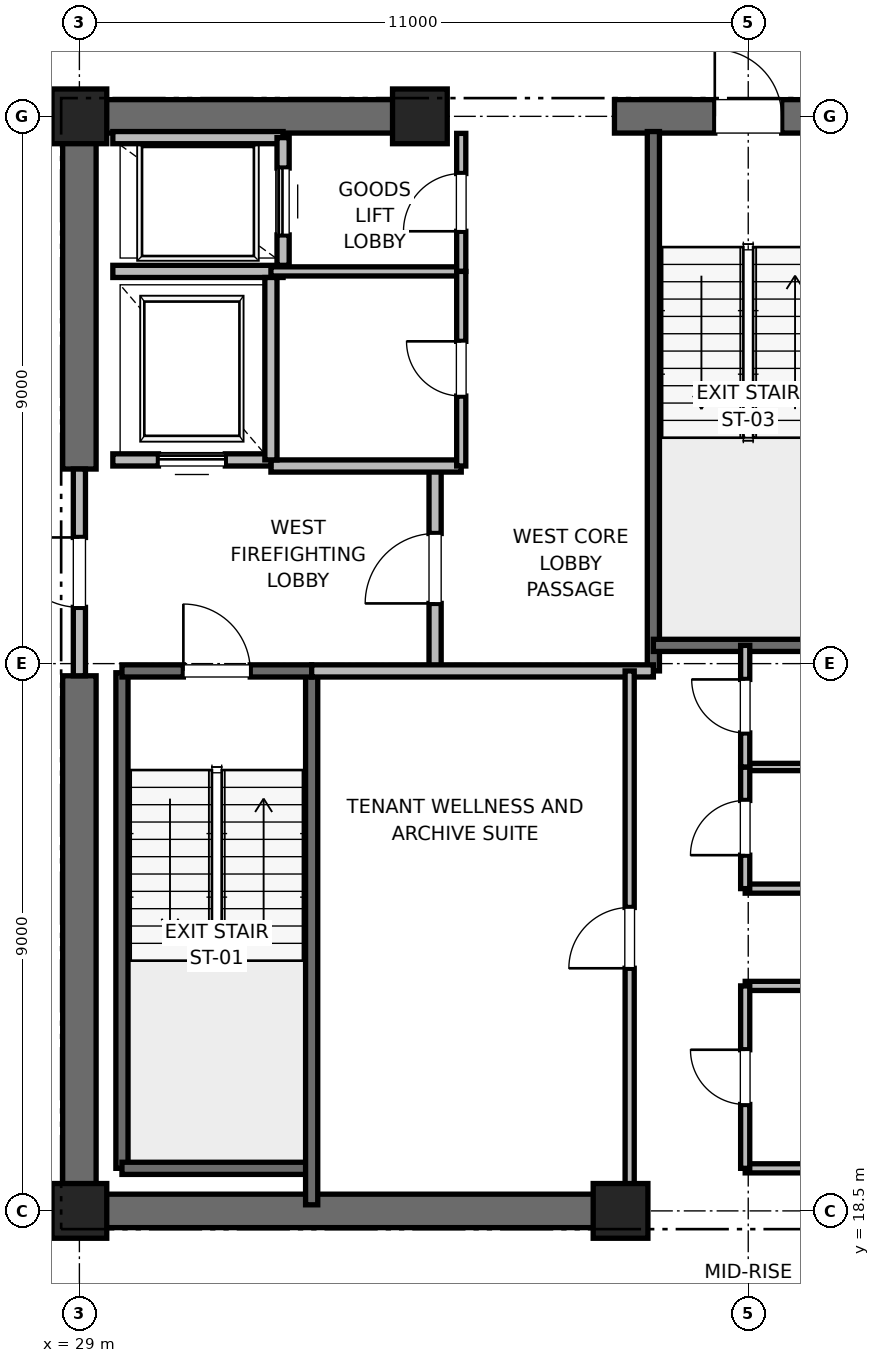
"""IFC4 building model, lengths in metres.
Left out: names, types, materials, properties, quantities, classifications, styles, units other than length and angle.
Written with IfcOpenShell. Run it as: python <this file> out.ifc"""

import sys

from ifc_helpers import new_model, si_unit, direction, frame, frame_2d, origin, origin_2d, place, context, subcontext, project, spatial, rectangle, extrude, element, fill, save


model = new_model("IFC4")
c1 = context("Model", 3, precision=1e-05, world=origin(), true_north=direction((0.0, 1.0)))
c2 = subcontext(c1, "Body", "Model", "MODEL_VIEW")
j1 = project(units=[si_unit("LENGTHUNIT", "METRE"), si_unit("PLANEANGLEUNIT", "RADIAN")], contexts=[c1])
p1 = place(None, origin())
s1 = spatial("IfcSite", under=j1, at=p1, CompositionType="ELEMENT")
p2 = place(p1, origin())
s2 = spatial("IfcBuilding", under=s1, at=p2, CompositionType="ELEMENT")
p3 = place(p2, frame((0.0, 0.0, 213.2)))
s3 = spatial("IfcBuildingStorey", under=s2, at=p3, CompositionType="ELEMENT", Elevation=213.2)
for number, where, z_axis, x_axis in (
    (1, (29.0, 18.5, 0.0), (0.0, 0.0, 1.0), (1.0, 0.0, 0.0)),
    (2, (29.0, 36.5, 0.0), (0.0, 0.0, 1.0), (1.0, 0.0, 0.0)),
    (3, (37.9, 18.5, 0.0), (0.0, 0.0, 1.0), (1.0, 0.0, 0.0)),
    (4, (34.6, 36.5, 0.0), (0.0, 0.0, 1.0), (1.0, 0.0, 0.0)),
):
    element("IfcColumn", number, at=place(p3, frame(where, z_axis=z_axis, x_axis=x_axis)), inside=s3, PredefinedType="PILASTER", context=c2, shape_type="SweptSolid", body=[
        extrude(rectangle(XDim=0.9, YDim=0.9, at=origin_2d()), origin(), (0.0, 0.0, 1.0), 4.0),
    ])
p4 = place(p3, frame((29.0, 18.5, 0.0), z_axis=(0.0, 0.0, 1.0), x_axis=(1.0, 0.0, 0.0)))
e5 = element("IfcWall", 5, at=p4, inside=s3, PredefinedType="SHEAR", context=c2, shape_type="SweptSolid", body=[
    extrude(rectangle(XDim=9.2, YDim=0.55, at=frame_2d((4.6, 0.0))), origin(), (0.0, 0.0, 1.0), 3.775),
])
p5 = place(p3, frame((29.0, 36.5, 0.0), z_axis=(0.0, 0.0, 1.0), x_axis=(1.0, 0.0, 0.0)))
e6 = element("IfcWall", 6, at=p5, inside=s3, PredefinedType="SHEAR", context=c2, shape_type="SweptSolid", body=[
    extrude(rectangle(XDim=5.8, YDim=0.55, at=frame_2d((2.9, 0.0))), origin(), (0.0, 0.0, 1.0), 3.775),
])
p6 = place(p3, frame((37.8, 36.5, 0.0), z_axis=(0.0, 0.0, 1.0), x_axis=(1.0, 0.0, 0.0)))
e7 = element("IfcWall", 7, at=p6, inside=s3, PredefinedType="SHEAR", context=c2, shape_type="SweptSolid", body=[
    extrude(rectangle(XDim=4.4, YDim=0.55, at=frame_2d((2.2, 0.0))), origin(), (0.0, 0.0, 1.0), 3.775),
])
p7 = place(p6, frame((1.65, 0.0, 0.0)))
e8 = element("IfcOpeningElement", 8, at=p7, cuts=e7, PredefinedType="OPENING", context=c2, shape_type="SweptSolid", body=[
    extrude(rectangle(XDim=1.1, YDim=2.15, at=frame_2d((0.55, 1.075))), frame((0.0, 0.275, 0.0), z_axis=(0.0, -1.0, 0.0), x_axis=(1.0, 0.0, 0.0)), (0.0, 0.0, 1.0), 0.55),
])
p8 = place(p3, frame((29.0, 18.5, 0.0), z_axis=(0.0, 0.0, 1.0), x_axis=(0.0, 1.0, 0.0)))
e9 = element("IfcWall", 9, at=p8, inside=s3, PredefinedType="SHEAR", context=c2, shape_type="SweptSolid", body=[
    extrude(rectangle(XDim=8.8, YDim=0.55, at=frame_2d((4.4, 0.0))), origin(), (0.0, 0.0, 1.0), 3.775),
])
p9 = place(p3, frame((29.0, 30.7, 0.0), z_axis=(0.0, 0.0, 1.0), x_axis=(0.0, 1.0, 0.0)))
e10 = element("IfcWall", 10, at=p9, inside=s3, PredefinedType="SHEAR", context=c2, shape_type="SweptSolid", body=[
    extrude(rectangle(XDim=5.8, YDim=0.55, at=frame_2d((2.9, 0.0))), origin(), (0.0, 0.0, 1.0), 3.775),
])
p10 = place(p3, frame((29.7, 19.2, 0.0), z_axis=(0.0, 0.0, 1.0), x_axis=(0.0, 1.0, 0.0)))
e11 = element("IfcWall", 11, at=p10, inside=s3, PredefinedType="SOLIDWALL", context=c2, shape_type="SweptSolid", body=[
    extrude(rectangle(XDim=8.15, YDim=0.2, at=frame_2d((4.075, 0.0))), origin(), (0.0, 0.0, 1.0), 3.775),
])
p11 = place(p3, frame((29.7, 19.2, 0.0), z_axis=(0.0, 0.0, 1.0), x_axis=(1.0, 0.0, 0.0)))
e12 = element("IfcWall", 12, at=p11, inside=s3, PredefinedType="SOLIDWALL", context=c2, shape_type="SweptSolid", body=[
    extrude(rectangle(XDim=3.12, YDim=0.2, at=frame_2d((1.56, 0.0))), origin(), (0.0, 0.0, 1.0), 3.775),
])
p12 = place(p3, frame((32.82, 18.6, 0.0), z_axis=(0.0, 0.0, 1.0), x_axis=(0.0, 1.0, 0.0)))
e13 = element("IfcWall", 13, at=p12, inside=s3, PredefinedType="SOLIDWALL", context=c2, shape_type="SweptSolid", body=[
    extrude(rectangle(XDim=8.78, YDim=0.2, at=frame_2d((4.39, 0.0))), origin(), (0.0, 0.0, 1.0), 3.775),
])
p13 = place(p3, frame((29.7, 27.38, 0.0), z_axis=(0.0, 0.0, 1.0), x_axis=(1.0, 0.0, 0.0)))
e14 = element("IfcWall", 14, at=p13, inside=s3, PredefinedType="SOLIDWALL", context=c2, shape_type="SweptSolid", body=[
    extrude(rectangle(XDim=3.12, YDim=0.2, at=frame_2d((1.56, 0.0))), origin(), (0.0, 0.0, 1.0), 3.775),
])
p14 = place(p13, frame((1.01, 0.0, 0.0)))
e15 = element("IfcOpeningElement", 15, at=p14, cuts=e14, PredefinedType="OPENING", context=c2, shape_type="SweptSolid", body=[
    extrude(rectangle(XDim=1.1, YDim=2.15, at=frame_2d((0.55, 1.075))), frame((0.0, 0.1, 0.0), z_axis=(0.0, -1.0, 0.0), x_axis=(1.0, 0.0, 0.0)), (0.0, 0.0, 1.0), 0.2),
])
p15 = place(p3, frame((38.44, 27.38, 0.0), z_axis=(0.0, 0.0, 1.0), x_axis=(0.0, 1.0, 0.0)))
e16 = element("IfcWall", 16, at=p15, inside=s3, PredefinedType="SOLIDWALL", context=c2, shape_type="SweptSolid", body=[
    extrude(rectangle(XDim=8.87, YDim=0.2, at=frame_2d((4.435, 0.0))), origin(), (0.0, 0.0, 1.0), 3.775),
])
p16 = place(p3, frame((38.44, 27.8, 0.0), z_axis=(0.0, 0.0, 1.0), x_axis=(1.0, 0.0, 0.0)))
e17 = element("IfcWall", 17, at=p16, inside=s3, PredefinedType="SOLIDWALL", context=c2, shape_type="SweptSolid", body=[
    extrude(rectangle(XDim=3.32, YDim=0.2, at=frame_2d((1.66, 0.0))), origin(), (0.0, 0.0, 1.0), 3.775),
])
p17 = place(p3, frame((34.85, 27.38, 0.0), z_axis=(0.0, 0.0, 1.0), x_axis=(0.0, 1.0, 0.0)))
e18 = element("IfcWall", 18, at=p17, inside=s3, PredefinedType="PARTITIONING", context=c2, shape_type="SweptSolid", body=[
    extrude(rectangle(XDim=3.37, YDim=0.2, at=frame_2d((1.685, 0.0))), origin(), (0.0, 0.0, 1.0), 3.775),
])
p18 = place(p17, frame((1.11, 0.0, 0.0)))
e19 = element("IfcOpeningElement", 19, at=p18, cuts=e18, PredefinedType="OPENING", context=c2, shape_type="SweptSolid", body=[
    extrude(rectangle(XDim=1.15, YDim=2.2, at=frame_2d((0.575, 1.1))), frame((0.0, 0.1, 0.0), z_axis=(0.0, -1.0, 0.0), x_axis=(1.0, 0.0, 0.0)), (0.0, 0.0, 1.0), 0.2),
])
p19 = place(p3, frame((29.0, 27.3, 0.0), z_axis=(0.0, 0.0, 1.0), x_axis=(0.0, 1.0, 0.0)))
e20 = element("IfcWall", 20, at=p19, inside=s3, PredefinedType="PARTITIONING", context=c2, shape_type="SweptSolid", body=[
    extrude(rectangle(XDim=3.4, YDim=0.2, at=frame_2d((1.7, 0.0))), origin(), (0.0, 0.0, 1.0), 2.755),
])
p20 = place(p19, frame((1.125, 0.0, 0.0)))
e21 = element("IfcOpeningElement", 21, at=p20, cuts=e20, PredefinedType="OPENING", context=c2, shape_type="SweptSolid", body=[
    extrude(rectangle(XDim=1.15, YDim=2.2, at=frame_2d((0.575, 1.1))), frame((0.0, 0.1, 0.0), z_axis=(0.0, -1.0, 0.0), x_axis=(1.0, 0.0, 0.0)), (0.0, 0.0, 1.0), 0.2),
])
p21 = place(p3, frame((32.82, 27.38, 0.0), z_axis=(0.0, 0.0, 1.0), x_axis=(1.0, 0.0, 0.0)))
e22 = element("IfcWall", 22, at=p21, inside=s3, PredefinedType="PARTITIONING", context=c2, shape_type="SweptSolid", body=[
    extrude(rectangle(XDim=5.62, YDim=0.2, at=frame_2d((2.81, 0.0))), origin(), (0.0, 0.0, 1.0), 3.775),
])
p22 = place(p3, frame((32.15, 30.75, 0.0), z_axis=(0.0, 0.0, 1.0), x_axis=(1.0, 0.0, 0.0)))
e23 = element("IfcWall", 23, at=p22, inside=s3, PredefinedType="PARTITIONING", context=c2, shape_type="SweptSolid", body=[
    extrude(rectangle(XDim=3.13, YDim=0.2, at=frame_2d((1.565, 0.0))), origin(), (0.0, 0.0, 1.0), 3.775),
])
p23 = place(p3, frame((29.55, 30.85, 0.0), z_axis=(0.0, 0.0, 1.0), x_axis=(1.0, 0.0, 0.0)))
e24 = element("IfcWall", 24, at=p23, inside=s3, PredefinedType="SOLIDWALL", context=c2, shape_type="SweptSolid", body=[
    extrude(rectangle(XDim=2.6, YDim=0.2, at=frame_2d((1.3, 0.0))), origin(), (0.0, 0.0, 1.0), 2.755),
])
p24 = place(p23, frame((0.75, 0.0, 0.0)))
e25 = element("IfcOpeningElement", 25, at=p24, cuts=e24, PredefinedType="OPENING", context=c2, shape_type="SweptSolid", body=[
    extrude(rectangle(XDim=1.1, YDim=2.2, at=frame_2d((0.55, 1.1))), frame((0.0, 0.1, 0.0), z_axis=(0.0, -1.0, 0.0), x_axis=(1.0, 0.0, 0.0)), (0.0, 0.0, 1.0), 0.2),
])
p25 = place(p3, frame((29.55, 33.95, 0.0), z_axis=(0.0, 0.0, 1.0), x_axis=(1.0, 0.0, 0.0)))
e26 = element("IfcWall", 26, at=p25, inside=s3, PredefinedType="SOLIDWALL", context=c2, shape_type="SweptSolid", body=[
    extrude(rectangle(XDim=2.8, YDim=0.2, at=frame_2d((1.4, 0.0))), origin(), (0.0, 0.0, 1.0), 3.775),
])
p26 = place(p3, frame((32.15, 30.85, 0.0), z_axis=(0.0, 0.0, 1.0), x_axis=(0.0, 1.0, 0.0)))
e27 = element("IfcWall", 27, at=p26, inside=s3, PredefinedType="SOLIDWALL", context=c2, shape_type="SweptSolid", body=[
    extrude(rectangle(XDim=3.0, YDim=0.2, at=frame_2d((1.5, 0.0))), origin(), (0.0, 0.0, 1.0), 3.775),
])
p27 = place(p3, frame((32.35, 36.15, 0.0), z_axis=(0.0, 0.0, 1.0), x_axis=(-1.0, 0.0, 0.0)))
e28 = element("IfcWall", 28, at=p27, inside=s3, PredefinedType="SOLIDWALL", context=c2, shape_type="SweptSolid", body=[
    extrude(rectangle(XDim=2.8, YDim=0.2, at=frame_2d((1.4, 0.0))), origin(), (0.0, 0.0, 1.0), 3.062),
])
p28 = place(p3, frame((32.35, 34.05, 0.0), z_axis=(0.0, 0.0, 1.0), x_axis=(0.0, 1.0, 0.0)))
e29 = element("IfcWall", 29, at=p28, inside=s3, PredefinedType="SOLIDWALL", context=c2, shape_type="SweptSolid", body=[
    extrude(rectangle(XDim=2.1, YDim=0.2, at=frame_2d((1.05, 0.0))), origin(), (0.0, 0.0, 1.0), 3.775),
])
p29 = place(p28, frame((0.5, 0.0, 0.0)))
e30 = element("IfcOpeningElement", 30, at=p29, cuts=e29, PredefinedType="OPENING", context=c2, shape_type="SweptSolid", body=[
    extrude(rectangle(XDim=1.1, YDim=2.2, at=frame_2d((0.55, 1.1))), frame((0.0, 0.1, 0.0), z_axis=(0.0, -1.0, 0.0), x_axis=(1.0, 0.0, 0.0)), (0.0, 0.0, 1.0), 0.2),
])
for number, where, z_axis, x_axis in (
    (31, (39.95, 19.2, 0.0), (0.0, 0.0, 1.0), (1.0, 0.0, 0.0)),
    (32, (39.95, 22.2, 0.0), (0.0, 0.0, 1.0), (1.0, 0.0, 0.0)),
    (33, (39.95, 23.8, 0.0), (0.0, 0.0, 1.0), (1.0, 0.0, 0.0)),
):
    element("IfcWall", number, at=place(p3, frame(where, z_axis=z_axis, x_axis=x_axis)), inside=s3, PredefinedType="PARTITIONING", context=c2, shape_type="SweptSolid", body=[
        extrude(rectangle(XDim=1.81, YDim=0.15, at=frame_2d((0.905, 0.0))), origin(), (0.0, 0.0, 1.0), 2.85),
    ])
p30 = place(p3, frame((39.95, 25.8, 0.0), z_axis=(0.0, 0.0, 1.0), x_axis=(1.0, 0.0, 0.0)))
e34 = element("IfcWall", 34, at=p30, inside=s3, PredefinedType="PARTITIONING", context=c2, shape_type="SweptSolid", body=[
    extrude(rectangle(XDim=1.81, YDim=0.12, at=frame_2d((0.905, 0.0))), origin(), (0.0, 0.0, 1.0), 2.85),
])
p31 = place(p3, frame((39.95, 19.2, 0.0), z_axis=(0.0, 0.0, 1.0), x_axis=(0.0, 1.0, 0.0)))
e35 = element("IfcWall", 35, at=p31, inside=s3, PredefinedType="PARTITIONING", context=c2, shape_type="SweptSolid", body=[
    extrude(rectangle(XDim=3.0, YDim=0.15, at=frame_2d((1.5, 0.0))), origin(), (0.0, 0.0, 1.0), 2.85),
])
p32 = place(p31, frame((1.05, 0.0, 0.0)))
e36 = element("IfcOpeningElement", 36, at=p32, cuts=e35, PredefinedType="OPENING", context=c2, shape_type="SweptSolid", body=[
    extrude(rectangle(XDim=0.9, YDim=2.1, at=frame_2d((0.45, 1.05))), frame((0.0, 0.075, 0.0), z_axis=(0.0, -1.0, 0.0), x_axis=(1.0, 0.0, 0.0)), (0.0, 0.0, 1.0), 0.15),
])
p33 = place(p3, frame((39.95, 23.8, 0.0), z_axis=(0.0, 0.0, 1.0), x_axis=(0.0, 1.0, 0.0)))
e37 = element("IfcWall", 37, at=p33, inside=s3, PredefinedType="PARTITIONING", context=c2, shape_type="SweptSolid", body=[
    extrude(rectangle(XDim=2.0, YDim=0.15, at=frame_2d((1.0, 0.0))), origin(), (0.0, 0.0, 1.0), 2.85),
])
p34 = place(p33, frame((0.55, 0.0, 0.0)))
e38 = element("IfcOpeningElement", 38, at=p34, cuts=e37, PredefinedType="OPENING", context=c2, shape_type="SweptSolid", body=[
    extrude(rectangle(XDim=0.9, YDim=2.1, at=frame_2d((0.45, 1.05))), frame((0.0, 0.075, 0.0), z_axis=(0.0, -1.0, 0.0), x_axis=(1.0, 0.0, 0.0)), (0.0, 0.0, 1.0), 0.15),
])
p35 = place(p3, frame((39.95, 25.8, 0.0), z_axis=(0.0, 0.0, 1.0), x_axis=(0.0, 1.0, 0.0)))
e39 = element("IfcWall", 39, at=p35, inside=s3, PredefinedType="PARTITIONING", context=c2, shape_type="SweptSolid", body=[
    extrude(rectangle(XDim=2.0, YDim=0.15, at=frame_2d((1.0, 0.0))), origin(), (0.0, 0.0, 1.0), 2.85),
])
p36 = place(p35, frame((0.56, 0.0, 0.0)))
e40 = element("IfcOpeningElement", 40, at=p36, cuts=e39, PredefinedType="OPENING", context=c2, shape_type="SweptSolid", body=[
    extrude(rectangle(XDim=0.88, YDim=2.1, at=frame_2d((0.44, 1.05))), frame((0.0, 0.075, 0.0), z_axis=(0.0, -1.0, 0.0), x_axis=(1.0, 0.0, 0.0)), (0.0, 0.0, 1.0), 0.15),
])
p37 = place(p3, frame((32.15, 33.95, 0.0), z_axis=(0.0, 0.0, 1.0), x_axis=(1.0, 0.0, 0.0)))
e41 = element("IfcWall", 41, at=p37, inside=s3, PredefinedType="PARTITIONING", context=c2, shape_type="SweptSolid", body=[
    extrude(rectangle(XDim=3.13, YDim=0.15, at=frame_2d((1.565, 0.0))), origin(), (0.0, 0.0, 1.0), 2.85),
])
p38 = place(p3, frame((35.28, 33.95, 0.0), z_axis=(0.0, 0.0, 1.0), x_axis=(0.0, 1.0, 0.0)))
e42 = element("IfcWall", 42, at=p38, inside=s3, PredefinedType="PARTITIONING", context=c2, shape_type="SweptSolid", body=[
    extrude(rectangle(XDim=2.27, YDim=0.15, at=frame_2d((1.135, 0.0))), origin(), (0.0, 0.0, 1.0), 2.755),
])
p39 = place(p38, frame((0.66, 0.0, 0.0)))
e43 = element("IfcOpeningElement", 43, at=p39, cuts=e42, PredefinedType="OPENING", context=c2, shape_type="SweptSolid", body=[
    extrude(rectangle(XDim=0.95, YDim=2.15, at=frame_2d((0.475, 1.075))), frame((0.0, 0.075, 0.0), z_axis=(0.0, -1.0, 0.0), x_axis=(1.0, 0.0, 0.0)), (0.0, 0.0, 1.0), 0.15),
])
p40 = place(p3, frame((35.28, 30.75, 0.0), z_axis=(0.0, 0.0, 1.0), x_axis=(0.0, 1.0, 0.0)))
e44 = element("IfcWall", 44, at=p40, inside=s3, PredefinedType="PARTITIONING", context=c2, shape_type="SweptSolid", body=[
    extrude(rectangle(XDim=3.2, YDim=0.15, at=frame_2d((1.6, 0.0))), origin(), (0.0, 0.0, 1.0), 2.85),
])
p41 = place(p40, frame((1.15, 0.0, 0.0)))
e45 = element("IfcOpeningElement", 45, at=p41, cuts=e44, PredefinedType="OPENING", context=c2, shape_type="SweptSolid", body=[
    extrude(rectangle(XDim=0.9, YDim=2.1, at=frame_2d((0.45, 1.05))), frame((0.0, 0.075, 0.0), z_axis=(0.0, -1.0, 0.0), x_axis=(1.0, 0.0, 0.0)), (0.0, 0.0, 1.0), 0.15),
])
p42 = place(p3, frame((38.05, 18.6, 0.0), z_axis=(0.0, 0.0, 1.0), x_axis=(0.0, 1.0, 0.0)))
e46 = element("IfcWall", 46, at=p42, inside=s3, PredefinedType="PARTITIONING", context=c2, shape_type="SweptSolid", body=[
    extrude(rectangle(XDim=8.78, YDim=0.15, at=frame_2d((4.39, 0.0))), origin(), (0.0, 0.0, 1.0), 2.755),
])
p43 = place(p42, frame((3.89, 0.0, 0.0)))
e47 = element("IfcOpeningElement", 47, at=p43, cuts=e46, PredefinedType="OPENING", context=c2, shape_type="SweptSolid", body=[
    extrude(rectangle(XDim=1.0, YDim=2.15, at=frame_2d((0.5, 1.075))), frame((0.0, 0.075, 0.0), z_axis=(0.0, -1.0, 0.0), x_axis=(1.0, 0.0, 0.0)), (0.0, 0.0, 1.0), 0.15),
])
p44 = place(p14, origin())
e48 = element("IfcDoor", 48, at=p44, inside=s3, OperationType="SINGLE_SWING_LEFT", PredefinedType="DOOR", context=c2, shape_type="SweptSolid", body=[
    extrude(rectangle(XDim=1.1, YDim=2.15, at=frame_2d((0.55, 1.075))), frame((0.0, 0.025, 0.0), z_axis=(0.0, -1.0, 0.0), x_axis=(1.0, 0.0, 0.0)), (0.0, 0.0, 1.0), 0.05),
])
fill(e15, e48)
p45 = place(p7, origin())
e49 = element("IfcDoor", 49, at=p45, inside=s3, OperationType="SINGLE_SWING_LEFT", PredefinedType="DOOR", context=c2, shape_type="SweptSolid", body=[
    extrude(rectangle(XDim=1.1, YDim=2.15, at=frame_2d((0.55, 1.075))), frame((0.0, 0.025, 0.0), z_axis=(0.0, -1.0, 0.0), x_axis=(1.0, 0.0, 0.0)), (0.0, 0.0, 1.0), 0.05),
])
fill(e8, e49)
p46 = place(p18, origin())
e50 = element("IfcDoor", 50, at=p46, inside=s3, OperationType="SINGLE_SWING_LEFT", PredefinedType="DOOR", context=c2, shape_type="SweptSolid", body=[
    extrude(rectangle(XDim=1.15, YDim=2.2, at=frame_2d((0.575, 1.1))), frame((0.0, 0.025, 0.0), z_axis=(0.0, -1.0, 0.0), x_axis=(1.0, 0.0, 0.0)), (0.0, 0.0, 1.0), 0.05),
])
fill(e19, e50)
p47 = place(p20, origin())
e51 = element("IfcDoor", 51, at=p47, inside=s3, OperationType="SINGLE_SWING_RIGHT", PredefinedType="DOOR", context=c2, shape_type="SweptSolid", body=[
    extrude(rectangle(XDim=1.15, YDim=2.2, at=frame_2d((0.575, 1.1))), frame((0.0, 0.025, 0.0), z_axis=(0.0, -1.0, 0.0), x_axis=(1.0, 0.0, 0.0)), (0.0, 0.0, 1.0), 0.05),
])
fill(e21, e51)
p48 = place(p24, origin())
e52 = element("IfcDoor", 52, at=p48, inside=s3, OperationType="SLIDING_TO_RIGHT", PredefinedType="DOOR", context=c2, shape_type="SweptSolid", body=[
    extrude(rectangle(XDim=1.1, YDim=2.2, at=frame_2d((0.55, 1.1))), frame((0.0, 0.025, 0.0), z_axis=(0.0, -1.0, 0.0), x_axis=(1.0, 0.0, 0.0)), (0.0, 0.0, 1.0), 0.05),
])
fill(e25, e52)
p49 = place(p29, origin())
e53 = element("IfcDoor", 53, at=p49, inside=s3, OperationType="SLIDING_TO_RIGHT", PredefinedType="DOOR", context=c2, shape_type="SweptSolid", body=[
    extrude(rectangle(XDim=1.1, YDim=2.2, at=frame_2d((0.55, 1.1))), frame((0.0, 0.025, 0.0), z_axis=(0.0, -1.0, 0.0), x_axis=(1.0, 0.0, 0.0)), (0.0, 0.0, 1.0), 0.05),
])
fill(e30, e53)
p50 = place(p32, origin())
e54 = element("IfcDoor", 54, at=p50, inside=s3, OperationType="SINGLE_SWING_RIGHT", PredefinedType="DOOR", context=c2, shape_type="SweptSolid", body=[
    extrude(rectangle(XDim=0.9, YDim=2.1, at=frame_2d((0.45, 1.05))), frame((0.0, 0.025, 0.0), z_axis=(0.0, -1.0, 0.0), x_axis=(1.0, 0.0, 0.0)), (0.0, 0.0, 1.0), 0.05),
])
fill(e36, e54)
p51 = place(p34, origin())
e55 = element("IfcDoor", 55, at=p51, inside=s3, OperationType="SINGLE_SWING_LEFT", PredefinedType="DOOR", context=c2, shape_type="SweptSolid", body=[
    extrude(rectangle(XDim=0.9, YDim=2.1, at=frame_2d((0.45, 1.05))), frame((0.0, 0.025, 0.0), z_axis=(0.0, -1.0, 0.0), x_axis=(1.0, 0.0, 0.0)), (0.0, 0.0, 1.0), 0.05),
])
fill(e38, e55)
p52 = place(p36, origin())
e56 = element("IfcDoor", 56, at=p52, inside=s3, OperationType="SINGLE_SWING_RIGHT", PredefinedType="DOOR", context=c2, shape_type="SweptSolid", body=[
    extrude(rectangle(XDim=0.88, YDim=2.1, at=frame_2d((0.44, 1.05))), frame((0.0, 0.025, 0.0), z_axis=(0.0, -1.0, 0.0), x_axis=(1.0, 0.0, 0.0)), (0.0, 0.0, 1.0), 0.05),
])
fill(e40, e56)
p53 = place(p39, origin())
e57 = element("IfcDoor", 57, at=p53, inside=s3, OperationType="SINGLE_SWING_LEFT", PredefinedType="DOOR", context=c2, shape_type="SweptSolid", body=[
    extrude(rectangle(XDim=0.95, YDim=2.15, at=frame_2d((0.475, 1.075))), frame((0.0, 0.025, 0.0), z_axis=(0.0, -1.0, 0.0), x_axis=(1.0, 0.0, 0.0)), (0.0, 0.0, 1.0), 0.05),
])
fill(e43, e57)
p54 = place(p41, origin())
e58 = element("IfcDoor", 58, at=p54, inside=s3, OperationType="SINGLE_SWING_RIGHT", PredefinedType="DOOR", context=c2, shape_type="SweptSolid", body=[
    extrude(rectangle(XDim=0.9, YDim=2.1, at=frame_2d((0.45, 1.05))), frame((0.0, 0.025, 0.0), z_axis=(0.0, -1.0, 0.0), x_axis=(1.0, 0.0, 0.0)), (0.0, 0.0, 1.0), 0.05),
])
fill(e45, e58)
p55 = place(p43, origin())
e59 = element("IfcDoor", 59, at=p55, inside=s3, OperationType="SINGLE_SWING_LEFT", PredefinedType="DOOR", context=c2, shape_type="SweptSolid", body=[
    extrude(rectangle(XDim=1.0, YDim=2.15, at=frame_2d((0.5, 1.075))), frame((0.0, 0.025, 0.0), z_axis=(0.0, -1.0, 0.0), x_axis=(1.0, 0.0, 0.0)), (0.0, 0.0, 1.0), 0.05),
])
fill(e47, e59)
save(model, sys.argv[1])
